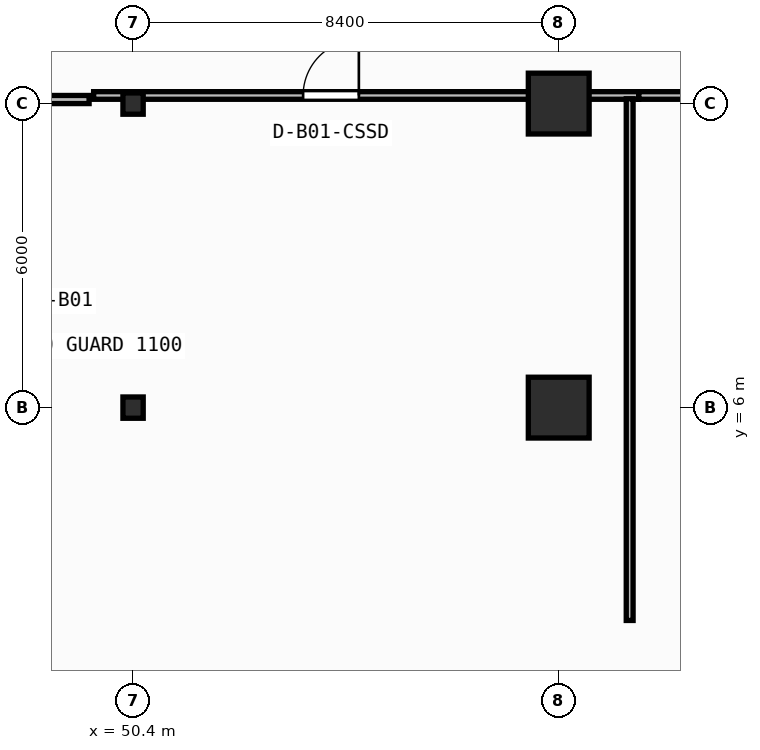
"""IFC4 building model, lengths in metres.
Left out: names, types, materials, properties, quantities, classifications, styles, units other than length and angle.
Written with IfcOpenShell. Run it as: python <this file> out.ifc"""

import sys

from ifc_helpers import new_model, si_unit, direction, frame, frame_2d, origin, origin_2d, place, context, subcontext, project, spatial, rectangle, i_section, extrude, element, fill, save


model = new_model("IFC4")
c1 = context("Model", 3, precision=1e-05, world=origin(), true_north=direction((0.0, 1.0)))
c2 = subcontext(c1, "Body", "Model", "MODEL_VIEW")
j1 = project(units=[si_unit("LENGTHUNIT", "METRE"), si_unit("PLANEANGLEUNIT", "RADIAN")], contexts=[c1])
p1 = place(None, origin())
s1 = spatial("IfcSite", under=j1, at=p1, CompositionType="ELEMENT")
p2 = place(p1, origin())
s2 = spatial("IfcBuilding", under=s1, at=p2, CompositionType="ELEMENT")
p3 = place(p2, frame((0.0, 0.0, -4.5)))
s3 = spatial("IfcBuildingStorey", under=s2, at=p3, CompositionType="ELEMENT", Elevation=-4.5)
p4 = place(p3, frame((50.4, 6.0, 0.0), z_axis=(0.0, 0.0, 1.0), x_axis=(1.0, 0.0, 0.0)))
e1 = element("IfcColumn", 1, at=p4, inside=s3, PredefinedType="COLUMN", context=c2, shape_type="SweptSolid", body=[
    extrude(i_section(OverallWidth=0.4, OverallDepth=0.42, WebThickness=0.025, FlangeThickness=0.04, at=origin_2d()), origin(), (0.0, 0.0, 1.0), 4.5),
])
p5 = place(p3, frame((58.8, 6.0, 0.0), z_axis=(0.0, 0.0, 1.0), x_axis=(1.0, 0.0, 0.0)))
e2 = element("IfcColumn", 2, at=p5, inside=s3, PredefinedType="COLUMN", context=c2, shape_type="SweptSolid", body=[
    extrude(rectangle(XDim=1.2, YDim=1.2, at=origin_2d()), origin(), (0.0, 0.0, 1.0), 4.5),
])
p6 = place(p3, frame((50.4, 12.0, 0.0), z_axis=(0.0, 0.0, 1.0), x_axis=(1.0, 0.0, 0.0)))
e3 = element("IfcColumn", 3, at=p6, inside=s3, PredefinedType="COLUMN", context=c2, shape_type="SweptSolid", body=[
    extrude(i_section(OverallWidth=0.4, OverallDepth=0.42, WebThickness=0.025, FlangeThickness=0.04, at=origin_2d()), origin(), (0.0, 0.0, 1.0), 4.5),
])
p7 = place(p3, frame((58.8, 12.0, 0.0), z_axis=(0.0, 0.0, 1.0), x_axis=(1.0, 0.0, 0.0)))
e4 = element("IfcColumn", 4, at=p7, inside=s3, PredefinedType="COLUMN", context=c2, shape_type="SweptSolid", body=[
    extrude(rectangle(XDim=1.2, YDim=1.2, at=origin_2d()), origin(), (0.0, 0.0, 1.0), 4.5),
])
p8 = place(p3, frame((49.622, 12.16, 0.0), z_axis=(0.0, 0.0, 1.0), x_axis=(1.0, 0.0, 0.0)))
e5 = element("IfcWall", 5, at=p8, inside=s3, PredefinedType="PARTITIONING", context=c2, shape_type="SweptSolid", body=[
    extrude(rectangle(XDim=10.757, YDim=0.15, at=frame_2d((5.378, 0.0))), origin(), (0.0, 0.0, 1.0), 3.315),
])
p9 = place(p8, frame((4.134, 0.0, 0.0)))
e6 = element("IfcOpeningElement", 6, at=p9, cuts=e5, PredefinedType="OPENING", context=c2, shape_type="SweptSolid", body=[
    extrude(rectangle(XDim=1.1, YDim=2.1, at=frame_2d((0.55, 1.05))), frame((0.0, 0.085, 0.0), z_axis=(0.0, -1.0, 0.0), x_axis=(1.0, 0.0, 0.0)), (0.0, 0.0, 1.0), 0.17),
])
p10 = place(p3, frame((60.381, 12.16, 0.0), z_axis=(0.0, 0.0, 1.0), x_axis=(1.0, 0.0, 0.0)))
e7 = element("IfcWall", 7, at=p10, inside=s3, PredefinedType="PARTITIONING", context=c2, shape_type="SweptSolid", body=[
    extrude(rectangle(XDim=9.198, YDim=0.15, at=frame_2d((4.599, 0.0))), origin(), (0.0, 0.0, 1.0), 3.315),
])
p11 = place(p10, frame((1.865, 0.0, 0.0)))
e8 = element("IfcOpeningElement", 8, at=p11, cuts=e7, PredefinedType="OPENING", context=c2, shape_type="SweptSolid", body=[
    extrude(rectangle(XDim=1.4, YDim=2.15, at=frame_2d((0.7, 1.075))), frame((0.0, 0.085, 0.0), z_axis=(0.0, -1.0, 0.0), x_axis=(1.0, 0.0, 0.0)), (0.0, 0.0, 1.0), 0.17),
])
p12 = place(p3, frame((60.2, 1.8, 0.0), z_axis=(0.0, 0.0, 1.0), x_axis=(0.0, 1.0, 0.0)))
e9 = element("IfcWall", 9, at=p12, inside=s3, PredefinedType="PARTITIONING", context=c2, shape_type="SweptSolid", body=[
    extrude(rectangle(XDim=10.295, YDim=0.135, at=frame_2d((5.147, 0.0))), origin(), (0.0, 0.0, 1.0), 4.25),
])
p13 = place(p3, frame((46.689, 12.08, 0.0), z_axis=(0.0, 0.0, 1.0), x_axis=(1.0, 0.0, 0.0)))
e10 = element("IfcWall", 10, at=p13, inside=s3, PredefinedType="PARTITIONING", context=c2, shape_type="SweptSolid", body=[
    extrude(rectangle(XDim=2.843, YDim=0.16, at=frame_2d((1.421, 0.0))), origin(), (0.0, 0.0, 1.0), 3.315),
])
p14 = place(p9, origin())
e11 = element("IfcDoor", 11, at=p14, inside=s3, OperationType="SINGLE_SWING_RIGHT", PredefinedType="DOOR", context=c2, shape_type="SweptSolid", body=[
    extrude(rectangle(XDim=1.1, YDim=2.1, at=frame_2d((0.55, 1.05))), frame((0.0, 0.025, 0.0), z_axis=(0.0, -1.0, 0.0), x_axis=(1.0, 0.0, 0.0)), (0.0, 0.0, 1.0), 0.05),
])
fill(e6, e11)
save(model, sys.argv[1])
